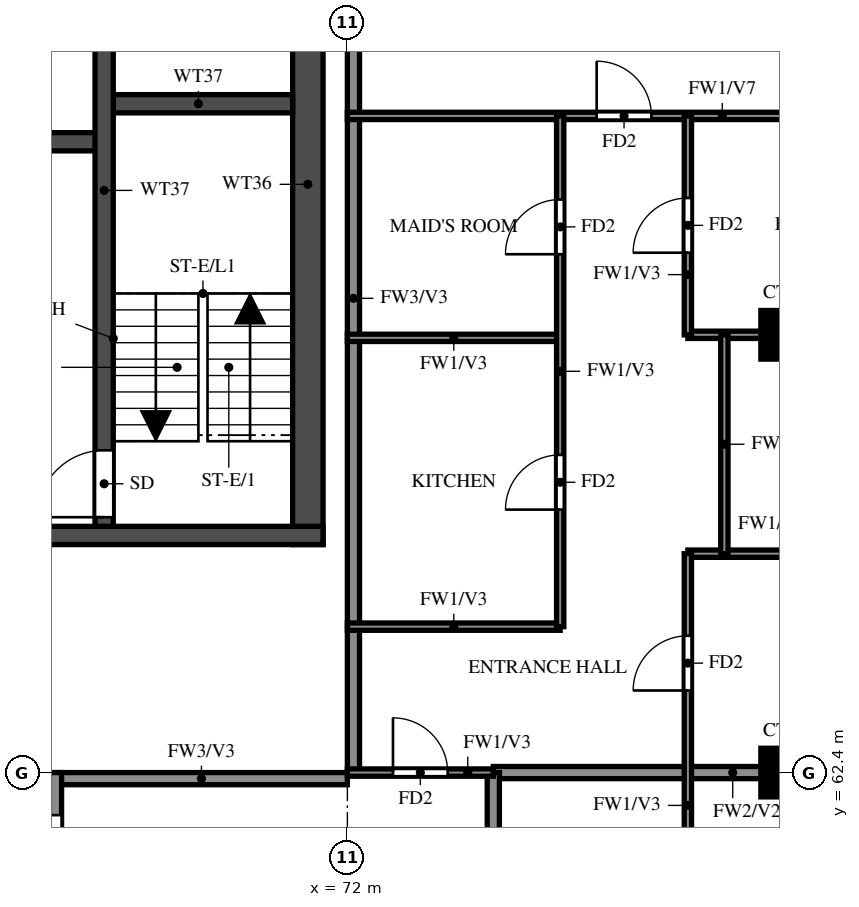
"""IFC4 building model, lengths in metres.
Left out: names, types, materials, properties, quantities, classifications, styles, units other than length and angle.
Written with IfcOpenShell. Run it as: python <this file> out.ifc"""

import sys

from ifc_helpers import new_model, si_unit, direction, frame, frame_2d, origin, origin_2d, place, context, subcontext, project, spatial, rectangle, extrude, source, transform, mapped, element, fill, save


model = new_model("IFC4")
c1 = context("Model", 3, precision=1e-05, world=origin(), true_north=direction((0.0, 1.0)))
c2 = subcontext(c1, "Body", "Model", "MODEL_VIEW")
j1 = project(units=[si_unit("LENGTHUNIT", "METRE"), si_unit("PLANEANGLEUNIT", "RADIAN")], contexts=[c1])
p1 = place(None, origin())
s1 = spatial("IfcSite", under=j1, at=p1, CompositionType="ELEMENT")
p2 = place(p1, origin())
s2 = spatial("IfcBuilding", under=s1, at=p2, CompositionType="ELEMENT")
p3 = place(p2, frame((0.0, 0.0, 236.0)))
s3 = spatial("IfcBuildingStorey", under=s2, at=p3, CompositionType="ELEMENT", Elevation=236.0)
m1 = source(origin(), c2, "Body", "SweptSolid", [
    extrude(rectangle(XDim=0.8, YDim=0.8, at=origin_2d()), origin(), (0.0, 0.0, 1.0), 3.22),
])
for number, where, z_axis, x_axis in (
    (1, (79.2, 62.4, 0.0), (0.0, 0.0, 1.0), (1.0, 0.0, 0.0)),
    (2, (79.2, 69.6, 0.0), (0.0, 0.0, 1.0), (1.0, 0.0, 0.0)),
):
    element("IfcColumn", number, at=place(p3, frame(where, z_axis=z_axis, x_axis=x_axis)), inside=s3, PredefinedType="COLUMN", context=c2, shape_type="MappedRepresentation", body=[
        mapped(m1, transform((0.0, 0.0, 0.0))),
    ])
p4 = place(p3, frame((71.35, 66.15, 0.0), z_axis=(0.0, 0.0, 1.0), x_axis=(0.0, 1.0, 0.0)))
e3 = element("IfcWall", 3, at=p4, inside=s3, PredefinedType="SHEAR", context=c2, shape_type="SweptSolid", body=[
    extrude(rectangle(XDim=11.85, YDim=0.5, at=frame_2d((5.925, 0.0))), origin(), (0.0, 0.0, 1.0), 3.22),
])
p5 = place(p3, frame((29.2, 66.3, 0.0), z_axis=(0.0, 0.0, 1.0), x_axis=(1.0, 0.0, 0.0)))
e4 = element("IfcWall", 4, at=p5, inside=s3, PredefinedType="SHEAR", context=c2, shape_type="SweptSolid", body=[
    extrude(rectangle(XDim=42.4, YDim=0.3, at=frame_2d((21.2, 0.0))), origin(), (0.0, 0.0, 1.0), 3.22),
])
p6 = place(p5, frame((1.425, 0.0, 0.0)))
e5 = element("IfcOpeningElement", 5, at=p6, cuts=e4, PredefinedType="OPENING", context=c2, shape_type="SweptSolid", body=[
    extrude(rectangle(XDim=1.1, YDim=2.1, at=frame_2d((0.55, 1.05))), frame((0.0, 0.16, 0.0), z_axis=(0.0, -1.0, 0.0), x_axis=(1.0, 0.0, 0.0)), (0.0, 0.0, 1.0), 0.32),
])
p7 = place(p5, frame((4.2, 0.0, 0.0)))
e6 = element("IfcOpeningElement", 6, at=p7, cuts=e4, PredefinedType="OPENING", context=c2, shape_type="SweptSolid", body=[
    extrude(rectangle(XDim=1.8, YDim=2.1, at=frame_2d((0.9, 1.05))), frame((0.0, 0.16, 0.0), z_axis=(0.0, -1.0, 0.0), x_axis=(1.0, 0.0, 0.0)), (0.0, 0.0, 1.0), 0.32),
])
p8 = place(p3, frame((32.8, 72.775, 0.0), z_axis=(0.0, 0.0, 1.0), x_axis=(1.0, 0.0, 0.0)))
e7 = element("IfcWall", 7, at=p8, inside=s3, PredefinedType="SHEAR", context=c2, shape_type="SweptSolid", body=[
    extrude(rectangle(XDim=35.2, YDim=0.3, at=frame_2d((17.6, 0.0))), origin(), (0.0, 0.0, 1.0), 3.22),
])
p9 = place(p8, frame((19.8, 0.0, 0.0)))
e8 = element("IfcOpeningElement", 8, at=p9, cuts=e7, PredefinedType="OPENING", context=c2, shape_type="SweptSolid", body=[
    extrude(rectangle(XDim=1.1, YDim=2.1, at=frame_2d((0.55, 1.05))), frame((0.0, 0.16, 0.0), z_axis=(0.0, -1.0, 0.0), x_axis=(1.0, 0.0, 0.0)), (0.0, 0.0, 1.0), 0.32),
])
p10 = place(p8, frame((27.725, 0.0, 0.0)))
e9 = element("IfcOpeningElement", 9, at=p10, cuts=e7, PredefinedType="OPENING", context=c2, shape_type="SweptSolid", body=[
    extrude(rectangle(XDim=1.1, YDim=2.1, at=frame_2d((0.55, 1.05))), frame((0.0, 0.16, 0.0), z_axis=(0.0, -1.0, 0.0), x_axis=(1.0, 0.0, 0.0)), (0.0, 0.0, 1.0), 0.32),
])
p11 = place(p8, frame((30.325, 0.0, 0.0)))
e10 = element("IfcOpeningElement", 10, at=p11, cuts=e7, PredefinedType="OPENING", context=c2, shape_type="SweptSolid", body=[
    extrude(rectangle(XDim=1.1, YDim=2.1, at=frame_2d((0.55, 1.05))), frame((0.0, 0.16, 0.0), z_axis=(0.0, -1.0, 0.0), x_axis=(1.0, 0.0, 0.0)), (0.0, 0.0, 1.0), 0.32),
])
p12 = place(p8, frame((3.825, 0.0, 0.0)))
e11 = element("IfcOpeningElement", 11, at=p12, cuts=e7, PredefinedType="OPENING", context=c2, shape_type="SweptSolid", body=[
    extrude(rectangle(XDim=1.1, YDim=2.1, at=frame_2d((0.55, 1.05))), frame((0.0, 0.16, 0.0), z_axis=(0.0, -1.0, 0.0), x_axis=(1.0, 0.0, 0.0)), (0.0, 0.0, 1.0), 0.32),
])
p13 = place(p8, frame((6.575, 0.0, 0.0)))
e12 = element("IfcOpeningElement", 12, at=p13, cuts=e7, PredefinedType="OPENING", context=c2, shape_type="SweptSolid", body=[
    extrude(rectangle(XDim=1.1, YDim=2.1, at=frame_2d((0.55, 1.05))), frame((0.0, 0.16, 0.0), z_axis=(0.0, -1.0, 0.0), x_axis=(1.0, 0.0, 0.0)), (0.0, 0.0, 1.0), 0.32),
])
p14 = place(p8, frame((9.325, 0.0, 0.0)))
e13 = element("IfcOpeningElement", 13, at=p14, cuts=e7, PredefinedType="OPENING", context=c2, shape_type="SweptSolid", body=[
    extrude(rectangle(XDim=1.1, YDim=2.1, at=frame_2d((0.55, 1.05))), frame((0.0, 0.16, 0.0), z_axis=(0.0, -1.0, 0.0), x_axis=(1.0, 0.0, 0.0)), (0.0, 0.0, 1.0), 0.32),
])
p15 = place(p8, frame((12.075, 0.0, 0.0)))
e14 = element("IfcOpeningElement", 14, at=p15, cuts=e7, PredefinedType="OPENING", context=c2, shape_type="SweptSolid", body=[
    extrude(rectangle(XDim=1.1, YDim=2.1, at=frame_2d((0.55, 1.05))), frame((0.0, 0.16, 0.0), z_axis=(0.0, -1.0, 0.0), x_axis=(1.0, 0.0, 0.0)), (0.0, 0.0, 1.0), 0.32),
])
p16 = place(p8, frame((14.825, 0.0, 0.0)))
e15 = element("IfcOpeningElement", 15, at=p16, cuts=e7, PredefinedType="OPENING", context=c2, shape_type="SweptSolid", body=[
    extrude(rectangle(XDim=1.1, YDim=2.1, at=frame_2d((0.55, 1.05))), frame((0.0, 0.16, 0.0), z_axis=(0.0, -1.0, 0.0), x_axis=(1.0, 0.0, 0.0)), (0.0, 0.0, 1.0), 0.32),
])
p17 = place(p8, frame((17.575, 0.0, 0.0)))
e16 = element("IfcOpeningElement", 16, at=p17, cuts=e7, PredefinedType="OPENING", context=c2, shape_type="SweptSolid", body=[
    extrude(rectangle(XDim=1.1, YDim=2.1, at=frame_2d((0.55, 1.05))), frame((0.0, 0.16, 0.0), z_axis=(0.0, -1.0, 0.0), x_axis=(1.0, 0.0, 0.0)), (0.0, 0.0, 1.0), 0.32),
])
p18 = place(p8, frame((0.95, 0.0, 0.0)))
e17 = element("IfcOpeningElement", 17, at=p18, cuts=e7, PredefinedType="OPENING", context=c2, shape_type="SweptSolid", body=[
    extrude(rectangle(XDim=1.1, YDim=2.1, at=frame_2d((0.55, 1.05))), frame((0.0, 0.16, 0.0), z_axis=(0.0, -1.0, 0.0), x_axis=(1.0, 0.0, 0.0)), (0.0, 0.0, 1.0), 0.32),
])
p19 = place(p3, frame((68.0, 73.4, 0.0), z_axis=(0.0, 0.0, 1.0), x_axis=(1.0, 0.0, 0.0)))
e18 = element("IfcWall", 18, at=p19, inside=s3, PredefinedType="SHEAR", context=c2, shape_type="SweptSolid", body=[
    extrude(rectangle(XDim=3.1, YDim=0.3, at=frame_2d((1.55, 0.0))), origin(), (0.0, 0.0, 1.0), 3.22),
])
p20 = place(p3, frame((68.0, 66.45, 0.0), z_axis=(0.0, 0.0, 1.0), x_axis=(0.0, 1.0, 0.0)))
e19 = element("IfcWall", 19, at=p20, inside=s3, PredefinedType="SHEAR", context=c2, shape_type="SweptSolid", body=[
    extrude(rectangle(XDim=11.05, YDim=0.3, at=frame_2d((5.525, 0.0))), origin(), (0.0, 0.0, 1.0), 3.22),
])
p21 = place(p20, frame((0.15, 0.0, 0.0)))
e20 = element("IfcOpeningElement", 20, at=p21, cuts=e19, PredefinedType="OPENING", context=c2, shape_type="SweptSolid", body=[
    extrude(rectangle(XDim=1.1, YDim=2.1, at=frame_2d((0.55, 1.05))), frame((0.0, 0.16, 0.0), z_axis=(0.0, -1.0, 0.0), x_axis=(1.0, 0.0, 0.0)), (0.0, 0.0, 1.0), 0.32),
])
p22 = place(p3, frame((67.2, 62.3, 0.0), z_axis=(0.0, 0.0, 1.0), x_axis=(1.0, 0.0, 0.0)))
e21 = element("IfcWall", 21, at=p22, inside=s3, PredefinedType="SOLIDWALL", context=c2, shape_type="SweptSolid", body=[
    extrude(rectangle(XDim=4.8, YDim=0.2, at=frame_2d((2.4, 0.0))), origin(), (0.0, 0.0, 1.0), 3.22),
])
p23 = place(p3, frame((67.2, 45.6, 0.0), z_axis=(0.0, 0.0, 1.0), x_axis=(0.0, 1.0, 0.0)))
e22 = element("IfcWall", 22, at=p23, inside=s3, PredefinedType="SOLIDWALL", context=c2, shape_type="SweptSolid", body=[
    extrude(rectangle(XDim=16.8, YDim=0.2, at=frame_2d((8.4, 0.0))), origin(), (0.0, 0.0, 1.0), 3.22),
])
p24 = place(p23, frame((6.7, 0.0, 0.0)))
e23 = element("IfcOpeningElement", 23, at=p24, cuts=e22, PredefinedType="OPENING", context=c2, shape_type="SweptSolid", body=[
    extrude(rectangle(XDim=1.0, YDim=2.1, at=frame_2d((0.5, 1.05))), frame((0.0, 0.11, 0.0), z_axis=(0.0, -1.0, 0.0), x_axis=(1.0, 0.0, 0.0)), (0.0, 0.0, 1.0), 0.22),
])
p25 = place(p23, frame((15.1, 0.0, 0.0)))
e24 = element("IfcOpeningElement", 24, at=p25, cuts=e22, PredefinedType="OPENING", context=c2, shape_type="SweptSolid", body=[
    extrude(rectangle(XDim=1.0, YDim=2.1, at=frame_2d((0.5, 1.05))), frame((0.0, 0.11, 0.0), z_axis=(0.0, -1.0, 0.0), x_axis=(1.0, 0.0, 0.0)), (0.0, 0.0, 1.0), 0.22),
])
p26 = place(p23, frame((0.7, 0.0, 0.0)))
e25 = element("IfcOpeningElement", 25, at=p26, cuts=e22, PredefinedType="OPENING", context=c2, shape_type="SweptSolid", body=[
    extrude(rectangle(XDim=1.0, YDim=2.1, at=frame_2d((0.5, 1.05))), frame((0.0, 0.11, 0.0), z_axis=(0.0, -1.0, 0.0), x_axis=(1.0, 0.0, 0.0)), (0.0, 0.0, 1.0), 0.22),
])
p27 = place(p3, frame((72.1, 62.4, 0.0), z_axis=(0.0, 0.0, 1.0), x_axis=(0.0, 1.0, 0.0)))
e26 = element("IfcWall", 26, at=p27, inside=s3, PredefinedType="SOLIDWALL", context=c2, shape_type="SweptSolid", body=[
    extrude(rectangle(XDim=15.6, YDim=0.2, at=frame_2d((7.8, 0.0))), origin(), (0.0, 0.0, 1.0), 3.22),
])
p28 = place(p3, frame((74.4, 62.4, 0.0), z_axis=(0.0, 0.0, 1.0), x_axis=(1.0, 0.0, 0.0)))
e27 = element("IfcWall", 27, at=p28, inside=s3, PredefinedType="SOLIDWALL", context=c2, shape_type="SweptSolid", body=[
    extrude(rectangle(XDim=7.875, YDim=0.2, at=frame_2d((3.938, 0.0))), origin(), (0.0, 0.0, 1.0), 3.22),
])
p29 = place(p3, frame((74.4, 60.0, 0.0), z_axis=(0.0, 0.0, 1.0), x_axis=(0.0, 1.0, 0.0)))
e28 = element("IfcWall", 28, at=p29, inside=s3, PredefinedType="SOLIDWALL", context=c2, shape_type="SweptSolid", body=[
    extrude(rectangle(XDim=2.4, YDim=0.2, at=frame_2d((1.2, 0.0))), origin(), (0.0, 0.0, 1.0), 3.22),
])
p30 = place(p3, frame((72.0, 62.4, 0.0), z_axis=(0.0, 0.0, 1.0), x_axis=(1.0, 0.0, 0.0)))
e29 = element("IfcWall", 29, at=p30, inside=s3, PredefinedType="PARTITIONING", context=c2, shape_type="SweptSolid", body=[
    extrude(rectangle(XDim=2.4, YDim=0.12, at=frame_2d((1.2, 0.0))), origin(), (0.0, 0.0, 1.0), 3.22),
])
p31 = place(p30, frame((0.75, 0.0, 0.0)))
e30 = element("IfcOpeningElement", 30, at=p31, cuts=e29, PredefinedType="OPENING", context=c2, shape_type="SweptSolid", body=[
    extrude(rectangle(XDim=0.9, YDim=2.1, at=frame_2d((0.45, 1.05))), frame((0.0, 0.07, 0.0), z_axis=(0.0, -1.0, 0.0), x_axis=(1.0, 0.0, 0.0)), (0.0, 0.0, 1.0), 0.14),
])
p32 = place(p3, frame((72.0, 64.8, 0.0), z_axis=(0.0, 0.0, 1.0), x_axis=(1.0, 0.0, 0.0)))
e31 = element("IfcWall", 31, at=p32, inside=s3, PredefinedType="PARTITIONING", context=c2, shape_type="SweptSolid", body=[
    extrude(rectangle(XDim=3.5, YDim=0.12, at=frame_2d((1.75, 0.0))), origin(), (0.0, 0.0, 1.0), 3.22),
])
p33 = place(p3, frame((77.6, 66.0, 0.0), z_axis=(0.0, 0.0, 1.0), x_axis=(1.0, 0.0, 0.0)))
e32 = element("IfcWall", 32, at=p33, inside=s3, PredefinedType="PARTITIONING", context=c2, shape_type="SweptSolid", body=[
    extrude(rectangle(XDim=4.675, YDim=0.12, at=frame_2d((2.337, 0.0))), origin(), (0.0, 0.0, 1.0), 2.32),
])
p34 = place(p33, frame((2.238, 0.0, 0.0)))
e33 = element("IfcOpeningElement", 33, at=p34, cuts=e32, PredefinedType="OPENING", context=c2, shape_type="SweptSolid", body=[
    extrude(rectangle(XDim=0.8, YDim=2.1, at=frame_2d((0.4, 1.05))), frame((0.0, 0.07, 0.0), z_axis=(0.0, -1.0, 0.0), x_axis=(1.0, 0.0, 0.0)), (0.0, 0.0, 1.0), 0.14),
])
p35 = place(p3, frame((72.0, 69.55, 0.0), z_axis=(0.0, 0.0, 1.0), x_axis=(1.0, 0.0, 0.0)))
e34 = element("IfcWall", 34, at=p35, inside=s3, PredefinedType="PARTITIONING", context=c2, shape_type="SweptSolid", body=[
    extrude(rectangle(XDim=3.5, YDim=0.12, at=frame_2d((1.75, 0.0))), origin(), (0.0, 0.0, 1.0), 3.22),
])
p36 = place(p3, frame((77.6, 69.6, 0.0), z_axis=(0.0, 0.0, 1.0), x_axis=(1.0, 0.0, 0.0)))
e35 = element("IfcWall", 35, at=p36, inside=s3, PredefinedType="PARTITIONING", context=c2, shape_type="SweptSolid", body=[
    extrude(rectangle(XDim=4.675, YDim=0.12, at=frame_2d((2.337, 0.0))), origin(), (0.0, 0.0, 1.0), 3.22),
])
p37 = place(p3, frame((72.0, 73.2, 0.0), z_axis=(0.0, 0.0, 1.0), x_axis=(1.0, 0.0, 0.0)))
e36 = element("IfcWall", 36, at=p37, inside=s3, PredefinedType="PARTITIONING", context=c2, shape_type="SweptSolid", body=[
    extrude(rectangle(XDim=10.275, YDim=0.12, at=frame_2d((5.137, 0.0))), origin(), (0.0, 0.0, 1.0), 2.32),
])
p38 = place(p37, frame((4.1, 0.0, 0.0)))
e37 = element("IfcOpeningElement", 37, at=p38, cuts=e36, PredefinedType="OPENING", context=c2, shape_type="SweptSolid", body=[
    extrude(rectangle(XDim=0.9, YDim=2.1, at=frame_2d((0.45, 1.05))), frame((0.0, 0.07, 0.0), z_axis=(0.0, -1.0, 0.0), x_axis=(1.0, 0.0, 0.0)), (0.0, 0.0, 1.0), 0.14),
])
p39 = place(p3, frame((75.5, 64.8, 0.0), z_axis=(0.0, 0.0, 1.0), x_axis=(0.0, 1.0, 0.0)))
e38 = element("IfcWall", 38, at=p39, inside=s3, PredefinedType="PARTITIONING", context=c2, shape_type="SweptSolid", body=[
    extrude(rectangle(XDim=8.4, YDim=0.12, at=frame_2d((4.2, 0.0))), origin(), (0.0, 0.0, 1.0), 3.22),
])
p40 = place(p39, frame((1.925, 0.0, 0.0)))
e39 = element("IfcOpeningElement", 39, at=p40, cuts=e38, PredefinedType="OPENING", context=c2, shape_type="SweptSolid", body=[
    extrude(rectangle(XDim=0.9, YDim=2.1, at=frame_2d((0.45, 1.05))), frame((0.0, 0.07, 0.0), z_axis=(0.0, -1.0, 0.0), x_axis=(1.0, 0.0, 0.0)), (0.0, 0.0, 1.0), 0.14),
])
p41 = place(p39, frame((6.125, 0.0, 0.0)))
e40 = element("IfcOpeningElement", 40, at=p41, cuts=e38, PredefinedType="OPENING", context=c2, shape_type="SweptSolid", body=[
    extrude(rectangle(XDim=0.9, YDim=2.1, at=frame_2d((0.45, 1.05))), frame((0.0, 0.07, 0.0), z_axis=(0.0, -1.0, 0.0), x_axis=(1.0, 0.0, 0.0)), (0.0, 0.0, 1.0), 0.14),
])
p42 = place(p3, frame((77.6, 58.8, 0.0), z_axis=(0.0, 0.0, 1.0), x_axis=(0.0, 1.0, 0.0)))
e41 = element("IfcWall", 41, at=p42, inside=s3, PredefinedType="PARTITIONING", context=c2, shape_type="SweptSolid", body=[
    extrude(rectangle(XDim=7.2, YDim=0.12, at=frame_2d((3.6, 0.0))), origin(), (0.0, 0.0, 1.0), 3.22),
])
p43 = place(p42, frame((1.35, 0.0, 0.0)))
e42 = element("IfcOpeningElement", 42, at=p43, cuts=e41, PredefinedType="OPENING", context=c2, shape_type="SweptSolid", body=[
    extrude(rectangle(XDim=0.9, YDim=2.1, at=frame_2d((0.45, 1.05))), frame((0.0, 0.07, 0.0), z_axis=(0.0, -1.0, 0.0), x_axis=(1.0, 0.0, 0.0)), (0.0, 0.0, 1.0), 0.14),
])
p44 = place(p42, frame((4.95, 0.0, 0.0)))
e43 = element("IfcOpeningElement", 43, at=p44, cuts=e41, PredefinedType="OPENING", context=c2, shape_type="SweptSolid", body=[
    extrude(rectangle(XDim=0.9, YDim=2.1, at=frame_2d((0.45, 1.05))), frame((0.0, 0.07, 0.0), z_axis=(0.0, -1.0, 0.0), x_axis=(1.0, 0.0, 0.0)), (0.0, 0.0, 1.0), 0.14),
])
p45 = place(p3, frame((77.6, 69.6, 0.0), z_axis=(0.0, 0.0, 1.0), x_axis=(0.0, 1.0, 0.0)))
e44 = element("IfcWall", 44, at=p45, inside=s3, PredefinedType="PARTITIONING", context=c2, shape_type="SweptSolid", body=[
    extrude(rectangle(XDim=3.6, YDim=0.12, at=frame_2d((1.8, 0.0))), origin(), (0.0, 0.0, 1.0), 3.22),
])
p46 = place(p45, frame((1.35, 0.0, 0.0)))
e45 = element("IfcOpeningElement", 45, at=p46, cuts=e44, PredefinedType="OPENING", context=c2, shape_type="SweptSolid", body=[
    extrude(rectangle(XDim=0.9, YDim=2.1, at=frame_2d((0.45, 1.05))), frame((0.0, 0.07, 0.0), z_axis=(0.0, -1.0, 0.0), x_axis=(1.0, 0.0, 0.0)), (0.0, 0.0, 1.0), 0.14),
])
p47 = place(p3, frame((78.2, 66.0, 0.0), z_axis=(0.0, 0.0, 1.0), x_axis=(0.0, 1.0, 0.0)))
e46 = element("IfcWall", 46, at=p47, inside=s3, PredefinedType="PARTITIONING", context=c2, shape_type="SweptSolid", body=[
    extrude(rectangle(XDim=3.6, YDim=0.12, at=frame_2d((1.8, 0.0))), origin(), (0.0, 0.0, 1.0), 3.22),
])
p48 = place(p21, origin())
e47 = element("IfcDoor", 47, at=p48, inside=s3, OperationType="SINGLE_SWING_RIGHT", PredefinedType="DOOR", context=c2, shape_type="SweptSolid", body=[
    extrude(rectangle(XDim=1.1, YDim=2.1, at=frame_2d((0.55, 1.05))), frame((0.0, 0.025, 0.0), z_axis=(0.0, -1.0, 0.0), x_axis=(1.0, 0.0, 0.0)), (0.0, 0.0, 1.0), 0.05),
])
fill(e20, e47)
p49 = place(p31, origin())
e48 = element("IfcDoor", 48, at=p49, inside=s3, OperationType="SINGLE_SWING_LEFT", PredefinedType="DOOR", context=c2, shape_type="SweptSolid", body=[
    extrude(rectangle(XDim=0.9, YDim=2.1, at=frame_2d((0.45, 1.05))), frame((0.0, 0.025, 0.0), z_axis=(0.0, -1.0, 0.0), x_axis=(1.0, 0.0, 0.0)), (0.0, 0.0, 1.0), 0.05),
])
fill(e30, e48)
p50 = place(p25, origin())
e49 = element("IfcDoor", 49, at=p50, inside=s3, OperationType="SINGLE_SWING_RIGHT", PredefinedType="DOOR", context=c2, shape_type="SweptSolid", body=[
    extrude(rectangle(XDim=1.0, YDim=2.1, at=frame_2d((0.5, 1.05))), frame((0.0, 0.025, 0.0), z_axis=(0.0, -1.0, 0.0), x_axis=(1.0, 0.0, 0.0)), (0.0, 0.0, 1.0), 0.05),
])
fill(e24, e49)
p51 = place(p44, origin())
e50 = element("IfcDoor", 50, at=p51, inside=s3, OperationType="SINGLE_SWING_LEFT", PredefinedType="DOOR", context=c2, shape_type="SweptSolid", body=[
    extrude(rectangle(XDim=0.9, YDim=2.1, at=frame_2d((0.45, 1.05))), frame((0.0, 0.025, 0.0), z_axis=(0.0, -1.0, 0.0), x_axis=(1.0, 0.0, 0.0)), (0.0, 0.0, 1.0), 0.05),
])
fill(e43, e50)
p52 = place(p46, origin())
e51 = element("IfcDoor", 51, at=p52, inside=s3, OperationType="SINGLE_SWING_RIGHT", PredefinedType="DOOR", context=c2, shape_type="SweptSolid", body=[
    extrude(rectangle(XDim=0.9, YDim=2.1, at=frame_2d((0.45, 1.05))), frame((0.0, 0.025, 0.0), z_axis=(0.0, -1.0, 0.0), x_axis=(1.0, 0.0, 0.0)), (0.0, 0.0, 1.0), 0.05),
])
fill(e45, e51)
p53 = place(p38, origin())
e52 = element("IfcDoor", 52, at=p53, inside=s3, OperationType="SINGLE_SWING_LEFT", PredefinedType="DOOR", context=c2, shape_type="SweptSolid", body=[
    extrude(rectangle(XDim=0.9, YDim=2.1, at=frame_2d((0.45, 1.05))), frame((0.0, 0.025, 0.0), z_axis=(0.0, -1.0, 0.0), x_axis=(1.0, 0.0, 0.0)), (0.0, 0.0, 1.0), 0.05),
])
fill(e37, e52)
p54 = place(p40, origin())
e53 = element("IfcDoor", 53, at=p54, inside=s3, OperationType="SINGLE_SWING_LEFT", PredefinedType="DOOR", context=c2, shape_type="SweptSolid", body=[
    extrude(rectangle(XDim=0.9, YDim=2.1, at=frame_2d((0.45, 1.05))), frame((0.0, 0.025, 0.0), z_axis=(0.0, -1.0, 0.0), x_axis=(1.0, 0.0, 0.0)), (0.0, 0.0, 1.0), 0.05),
])
fill(e39, e53)
p55 = place(p41, origin())
e54 = element("IfcDoor", 54, at=p55, inside=s3, OperationType="SINGLE_SWING_RIGHT", PredefinedType="DOOR", context=c2, shape_type="SweptSolid", body=[
    extrude(rectangle(XDim=0.9, YDim=2.1, at=frame_2d((0.45, 1.05))), frame((0.0, 0.025, 0.0), z_axis=(0.0, -1.0, 0.0), x_axis=(1.0, 0.0, 0.0)), (0.0, 0.0, 1.0), 0.05),
])
fill(e40, e54)
save(model, sys.argv[1])
